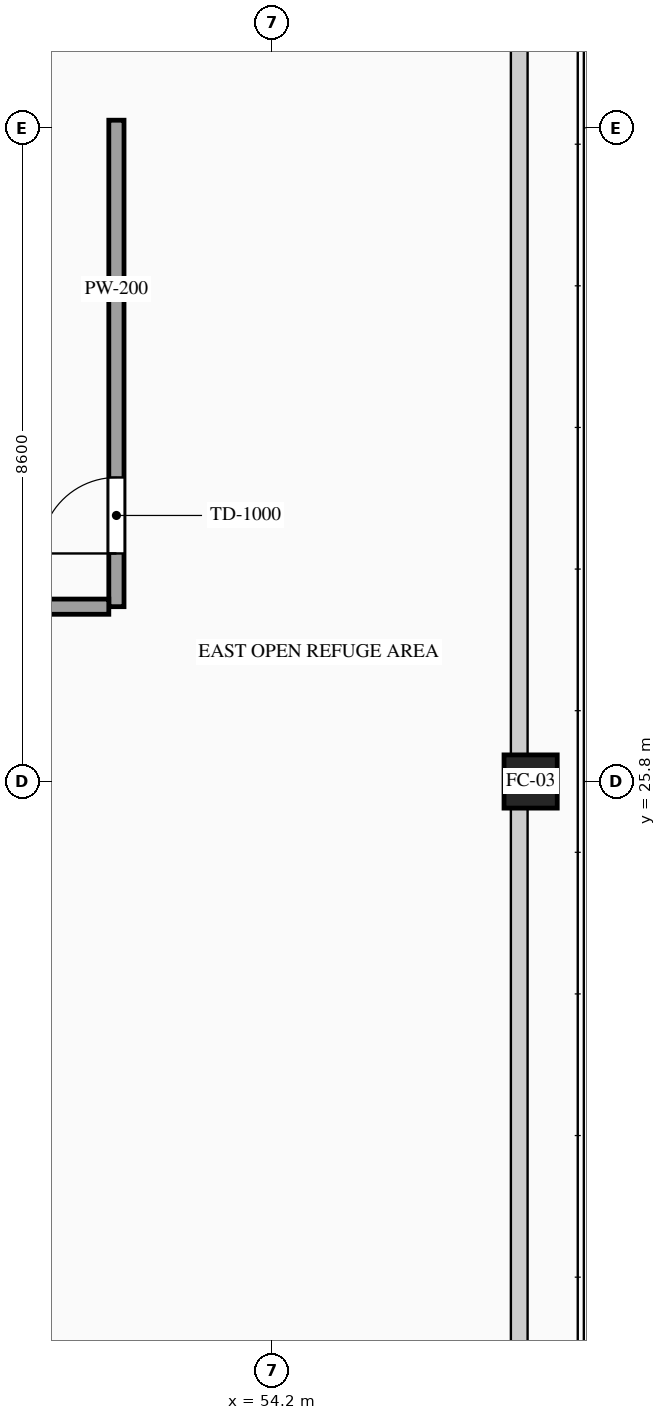
"""IFC4 building model, lengths in metres.
Left out: names, types, materials, properties, quantities, classifications, styles, units other than length and angle.
Written with IfcOpenShell. Run it as: python <this file> out.ifc"""

import sys

from ifc_helpers import new_model, si_unit, direction, frame, frame_2d, origin, origin_2d, place, context, subcontext, project, spatial, rectangle, hollow_rectangle, extrude, source, transform, mapped, element, fill, save


model = new_model("IFC4")
c1 = context("Model", 3, precision=1e-05, world=origin(), true_north=direction((0.0, 1.0)))
c2 = subcontext(c1, "Body", "Model", "MODEL_VIEW")
j1 = project(units=[si_unit("LENGTHUNIT", "METRE"), si_unit("PLANEANGLEUNIT", "RADIAN")], contexts=[c1])
p1 = place(None, origin())
s1 = spatial("IfcSite", under=j1, at=p1, CompositionType="ELEMENT")
p2 = place(p1, origin())
s2 = spatial("IfcBuilding", under=s1, at=p2, CompositionType="ELEMENT")
p3 = place(p2, frame((0.0, 0.0, 263.5)))
s3 = spatial("IfcBuildingStorey", under=s2, at=p3, CompositionType="ELEMENT", Elevation=263.5)
m1 = source(origin(), c2, "Body", "SweptSolid", [
    extrude(hollow_rectangle(XDim=0.7, YDim=0.7, WallThickness=0.032, at=origin_2d()), origin(), (0.0, 0.0, 1.0), 4.6),
])
p4 = place(p3, frame((57.6, 25.8, 0.0), z_axis=(0.0, 0.0, 1.0), x_axis=(1.0, 0.0, 0.0)))
e1 = element("IfcColumn", 1, at=p4, inside=s3, PredefinedType="COLUMN", context=c2, shape_type="MappedRepresentation", body=[
    mapped(m1, transform((0.0, 0.0, 0.0), scale=1.0)),
])
p5 = place(p3, frame((52.15, 28.1, 0.0), z_axis=(0.0, 0.0, 1.0), x_axis=(0.0, 1.0, 0.0)))
e2 = element("IfcWall", 2, at=p5, inside=s3, PredefinedType="PARTITIONING", context=c2, shape_type="SweptSolid", body=[
    extrude(rectangle(XDim=6.4, YDim=0.2, at=frame_2d((3.2, 0.0))), origin(), (0.0, 0.0, 1.0), 4.38),
])
p6 = place(p5, frame((0.7, 0.0, 0.0)))
e3 = element("IfcOpeningElement", 3, at=p6, cuts=e2, PredefinedType="OPENING", context=c2, shape_type="SweptSolid", body=[
    extrude(rectangle(XDim=1.0, YDim=2.2, at=frame_2d((0.5, 1.1))), frame((0.0, 0.115, 0.0), z_axis=(0.0, -1.0, 0.0), x_axis=(1.0, 0.0, 0.0)), (0.0, 0.0, 1.0), 0.23),
])
m2 = source(origin(), c2, "Body", "SweptSolid", [
    extrude(rectangle(XDim=1.555, YDim=0.2, at=frame_2d((0.777, 0.0))), origin(), (0.0, 0.0, 1.0), 4.38),
])
p7 = place(p3, frame((50.495, 28.1, 0.0), z_axis=(0.0, 0.0, 1.0), x_axis=(1.0, 0.0, 0.0)))
e4 = element("IfcWall", 4, at=p7, inside=s3, PredefinedType="PARTITIONING", context=c2, shape_type="MappedRepresentation", body=[
    mapped(m2, transform((0.0, 0.0, 0.0), scale=1.0)),
])
m3 = source(origin(), c2, "Body", "SweptSolid", [
    extrude(rectangle(XDim=1.0, YDim=2.2, at=frame_2d((0.5, 1.1))), frame((0.0, 0.025, 0.0), z_axis=(0.0, -1.0, 0.0), x_axis=(1.0, 0.0, 0.0)), (0.0, 0.0, 1.0), 0.05),
])
p8 = place(p6, origin())
e5 = element("IfcDoor", 5, at=p8, inside=s3, OperationType="SINGLE_SWING_LEFT", PredefinedType="DOOR", context=c2, shape_type="MappedRepresentation", body=[
    mapped(m3, transform((0.0, 0.0, 0.0), scale=1.0)),
])
fill(e3, e5)
save(model, sys.argv[1])
